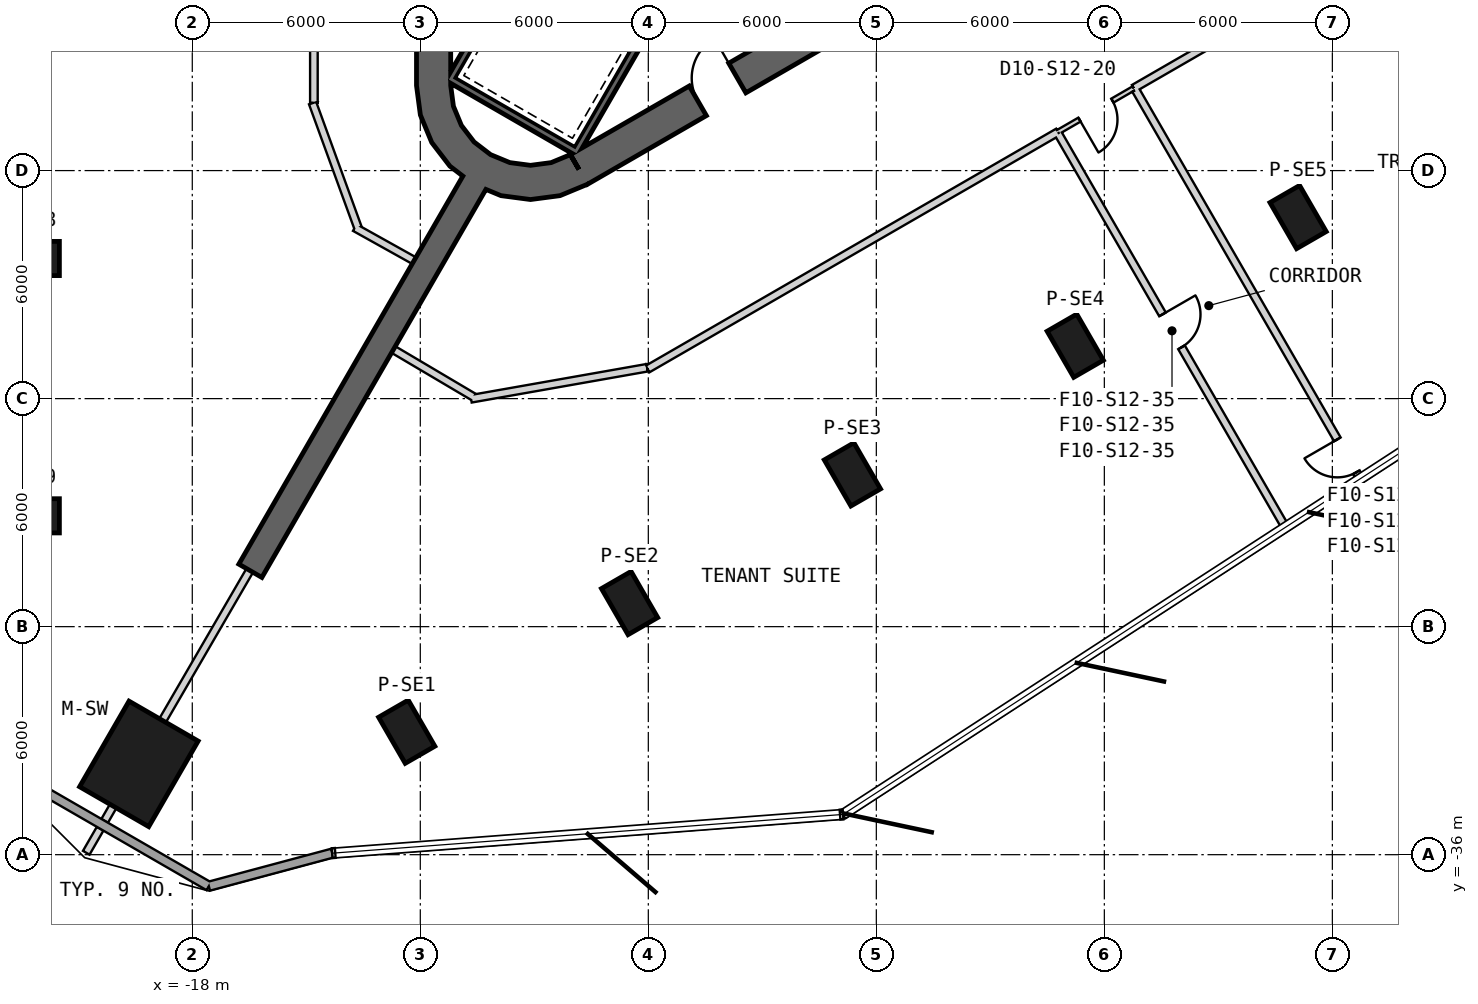
"""IFC4 building model, lengths in metres.
Left out: names, types, materials, properties, quantities, classifications, styles, units other than length and angle.
Written with IfcOpenShell. Run it as: python <this file> out.ifc"""

import sys

from ifc_helpers import new_model, si_unit, direction, frame, frame_2d, origin, origin_2d, place, context, subcontext, project, spatial, polyline, rectangle, outline, extrude, element, fill, save


model = new_model("IFC4")
c1 = context("Model", 3, precision=1e-05, world=origin(), true_north=direction((0.0, 1.0)))
c2 = subcontext(c1, "Body", "Model", "MODEL_VIEW")
j1 = project(units=[si_unit("LENGTHUNIT", "METRE"), si_unit("PLANEANGLEUNIT", "RADIAN")], contexts=[c1])
p1 = place(None, origin())
s1 = spatial("IfcSite", under=j1, at=p1, CompositionType="ELEMENT")
p2 = place(p1, origin())
s2 = spatial("IfcBuilding", under=s1, at=p2, CompositionType="ELEMENT")
p3 = place(p2, frame((0.0, 0.0, 205.2)))
s3 = spatial("IfcBuildingStorey", under=s2, at=p3, CompositionType="ELEMENT", Elevation=205.2)
p4 = place(p3, frame((-19.406, -33.611, 0.0), z_axis=(0.0, 0.0, 1.0), x_axis=(-0.5, -0.866025403784, 0.0)))
e1 = element("IfcColumn", 1, at=p4, inside=s3, PredefinedType="COLUMN", context=c2, shape_type="SweptSolid", body=[
    extrude(rectangle(XDim=2.6, YDim=2.1, at=origin_2d()), origin(), (0.0, 0.0, 1.0), 4.0),
])
for number, where, z_axis, x_axis in (
    (2, (-22.197, -20.313, 0.0), (0.0, 0.0, 1.0), (-1.0, 0.0, 0.0)),
    (3, (-22.197, -27.084, 0.0), (0.0, 0.0, 1.0), (-1.0, 0.0, 0.0)),
    (4, (-12.357, -32.765, 0.0), (0.0, 0.0, 1.0), (0.5, -0.866, 0.0)),
    (5, (-6.493, -29.38, 0.0), (0.0, 0.0, 1.0), (0.5, -0.866, 0.0)),
    (6, (-0.629, -25.994, 0.0), (0.0, 0.0, 1.0), (0.5, -0.866, 0.0)),
    (7, (5.235, -22.609, 0.0), (0.0, 0.0, 1.0), (0.5, -0.866, 0.0)),
    (8, (11.098, -19.223, 0.0), (0.0, 0.0, 1.0), (0.5, -0.866, 0.0)),
):
    element("IfcColumn", number, at=place(p3, frame(where, z_axis=z_axis, x_axis=x_axis)), inside=s3, PredefinedType="COLUMN", context=c2, shape_type="SweptSolid", body=[
        extrude(rectangle(XDim=1.4, YDim=0.9, at=origin_2d()), origin(), (0.0, 0.0, 1.0), 4.0),
    ])
p5 = place(p3, frame((-11.65, 15.762, 0.0), z_axis=(0.0, 0.0, 1.0), x_axis=(0.0, -1.0, 0.0)))
e9 = element("IfcWall", 9, at=p5, inside=s3, PredefinedType="SHEAR", context=c2, shape_type="SweptSolid", body=[
    extrude(rectangle(XDim=31.523, YDim=0.9, at=frame_2d((15.762, 0.0))), origin(), (0.0, 0.0, 1.0), 4.0),
])
p6 = place(p5, frame((7.062, 0.0, 0.0)))
e10 = element("IfcOpeningElement", 10, at=p6, cuts=e9, PredefinedType="OPENING", context=c2, shape_type="SweptSolid", body=[
    extrude(rectangle(XDim=1.2, YDim=2.4, at=frame_2d((0.6, 1.2))), frame((0.0, 0.46, 0.0), z_axis=(0.0, -1.0, 0.0), x_axis=(1.0, 0.0, 0.0)), (0.0, 0.0, 1.0), 0.92),
])
p7 = place(p5, frame((9.762, 0.0, 0.0)))
e11 = element("IfcOpeningElement", 11, at=p7, cuts=e9, PredefinedType="OPENING", context=c2, shape_type="SweptSolid", body=[
    extrude(rectangle(XDim=1.2, YDim=2.4, at=frame_2d((0.6, 1.2))), frame((0.0, 0.46, 0.0), z_axis=(0.0, -1.0, 0.0), x_axis=(1.0, 0.0, 0.0)), (0.0, 0.0, 1.0), 0.92),
])
p8 = place(p5, frame((12.462, 0.0, 0.0)))
e12 = element("IfcOpeningElement", 12, at=p8, cuts=e9, PredefinedType="OPENING", context=c2, shape_type="SweptSolid", body=[
    extrude(rectangle(XDim=1.2, YDim=2.4, at=frame_2d((0.6, 1.2))), frame((0.0, 0.46, 0.0), z_axis=(0.0, -1.0, 0.0), x_axis=(1.0, 0.0, 0.0)), (0.0, 0.0, 1.0), 0.92),
])
p9 = place(p5, frame((15.162, 0.0, 0.0)))
e13 = element("IfcOpeningElement", 13, at=p9, cuts=e9, PredefinedType="OPENING", context=c2, shape_type="SweptSolid", body=[
    extrude(rectangle(XDim=1.2, YDim=2.4, at=frame_2d((0.6, 1.2))), frame((0.0, 0.46, 0.0), z_axis=(0.0, -1.0, 0.0), x_axis=(1.0, 0.0, 0.0)), (0.0, 0.0, 1.0), 0.92),
])
p10 = place(p5, frame((17.862, 0.0, 0.0)))
e14 = element("IfcOpeningElement", 14, at=p10, cuts=e9, PredefinedType="OPENING", context=c2, shape_type="SweptSolid", body=[
    extrude(rectangle(XDim=1.2, YDim=2.4, at=frame_2d((0.6, 1.2))), frame((0.0, 0.46, 0.0), z_axis=(0.0, -1.0, 0.0), x_axis=(1.0, 0.0, 0.0)), (0.0, 0.0, 1.0), 0.92),
])
p11 = place(p5, frame((20.562, 0.0, 0.0)))
e15 = element("IfcOpeningElement", 15, at=p11, cuts=e9, PredefinedType="OPENING", context=c2, shape_type="SweptSolid", body=[
    extrude(rectangle(XDim=1.2, YDim=2.4, at=frame_2d((0.6, 1.2))), frame((0.0, 0.46, 0.0), z_axis=(0.0, -1.0, 0.0), x_axis=(1.0, 0.0, 0.0)), (0.0, 0.0, 1.0), 0.92),
])
p12 = place(p5, frame((23.262, 0.0, 0.0)))
e16 = element("IfcOpeningElement", 16, at=p12, cuts=e9, PredefinedType="OPENING", context=c2, shape_type="SweptSolid", body=[
    extrude(rectangle(XDim=1.2, YDim=2.4, at=frame_2d((0.6, 1.2))), frame((0.0, 0.46, 0.0), z_axis=(0.0, -1.0, 0.0), x_axis=(1.0, 0.0, 0.0)), (0.0, 0.0, 1.0), 0.92),
])
p13 = place(p5, frame((3.612, 0.0, 0.0)))
e17 = element("IfcOpeningElement", 17, at=p13, cuts=e9, PredefinedType="OPENING", context=c2, shape_type="SweptSolid", body=[
    extrude(rectangle(XDim=1.2, YDim=2.4, at=frame_2d((0.6, 1.2))), frame((0.0, 0.46, 0.0), z_axis=(0.0, -1.0, 0.0), x_axis=(1.0, 0.0, 0.0)), (0.0, 0.0, 1.0), 0.92),
])
p14 = place(p5, frame((26.712, 0.0, 0.0)))
e18 = element("IfcOpeningElement", 18, at=p14, cuts=e9, PredefinedType="OPENING", context=c2, shape_type="SweptSolid", body=[
    extrude(rectangle(XDim=1.2, YDim=2.4, at=frame_2d((0.6, 1.2))), frame((0.0, 0.46, 0.0), z_axis=(0.0, -1.0, 0.0), x_axis=(1.0, 0.0, 0.0)), (0.0, 0.0, 1.0), 0.92),
])
p15 = place(p3, frame((-7.825, -17.97, 0.0), z_axis=(0.0, 0.0, 1.0), x_axis=(0.866028369851, 0.499994862586, 0.0)))
e19 = element("IfcWall", 19, at=p15, inside=s3, PredefinedType="SHEAR", context=c2, shape_type="SweptSolid", body=[
    extrude(rectangle(XDim=31.523, YDim=0.9, at=frame_2d((15.762, 0.0))), origin(), (0.0, 0.0, 1.0), 4.0),
])
p16 = place(p15, frame((7.062, 0.0, 0.0)))
e20 = element("IfcOpeningElement", 20, at=p16, cuts=e19, PredefinedType="OPENING", context=c2, shape_type="SweptSolid", body=[
    extrude(rectangle(XDim=1.2, YDim=2.4, at=frame_2d((0.6, 1.2))), frame((0.0, 0.46, 0.0), z_axis=(0.0, -1.0, 0.0), x_axis=(1.0, 0.0, 0.0)), (0.0, 0.0, 1.0), 0.92),
])
p17 = place(p15, frame((9.762, 0.0, 0.0)))
e21 = element("IfcOpeningElement", 21, at=p17, cuts=e19, PredefinedType="OPENING", context=c2, shape_type="SweptSolid", body=[
    extrude(rectangle(XDim=1.2, YDim=2.4, at=frame_2d((0.6, 1.2))), frame((0.0, 0.46, 0.0), z_axis=(0.0, -1.0, 0.0), x_axis=(1.0, 0.0, 0.0)), (0.0, 0.0, 1.0), 0.92),
])
p18 = place(p15, frame((12.462, 0.0, 0.0)))
e22 = element("IfcOpeningElement", 22, at=p18, cuts=e19, PredefinedType="OPENING", context=c2, shape_type="SweptSolid", body=[
    extrude(rectangle(XDim=1.2, YDim=2.4, at=frame_2d((0.6, 1.2))), frame((0.0, 0.46, 0.0), z_axis=(0.0, -1.0, 0.0), x_axis=(1.0, 0.0, 0.0)), (0.0, 0.0, 1.0), 0.92),
])
p19 = place(p15, frame((15.162, 0.0, 0.0)))
e23 = element("IfcOpeningElement", 23, at=p19, cuts=e19, PredefinedType="OPENING", context=c2, shape_type="SweptSolid", body=[
    extrude(rectangle(XDim=1.2, YDim=2.4, at=frame_2d((0.6, 1.2))), frame((0.0, 0.46, 0.0), z_axis=(0.0, -1.0, 0.0), x_axis=(1.0, 0.0, 0.0)), (0.0, 0.0, 1.0), 0.92),
])
p20 = place(p15, frame((17.862, 0.0, 0.0)))
e24 = element("IfcOpeningElement", 24, at=p20, cuts=e19, PredefinedType="OPENING", context=c2, shape_type="SweptSolid", body=[
    extrude(rectangle(XDim=1.2, YDim=2.4, at=frame_2d((0.6, 1.2))), frame((0.0, 0.46, 0.0), z_axis=(0.0, -1.0, 0.0), x_axis=(1.0, 0.0, 0.0)), (0.0, 0.0, 1.0), 0.92),
])
p21 = place(p15, frame((20.562, 0.0, 0.0)))
e25 = element("IfcOpeningElement", 25, at=p21, cuts=e19, PredefinedType="OPENING", context=c2, shape_type="SweptSolid", body=[
    extrude(rectangle(XDim=1.2, YDim=2.4, at=frame_2d((0.6, 1.2))), frame((0.0, 0.46, 0.0), z_axis=(0.0, -1.0, 0.0), x_axis=(1.0, 0.0, 0.0)), (0.0, 0.0, 1.0), 0.92),
])
p22 = place(p15, frame((26.712, 0.0, 0.0)))
e26 = element("IfcOpeningElement", 26, at=p22, cuts=e19, PredefinedType="OPENING", context=c2, shape_type="SweptSolid", body=[
    extrude(rectangle(XDim=1.2, YDim=2.4, at=frame_2d((0.6, 1.2))), frame((0.0, 0.46, 0.0), z_axis=(0.0, -1.0, 0.0), x_axis=(1.0, 0.0, 0.0)), (0.0, 0.0, 1.0), 0.92),
])
p23 = place(p15, frame((3.612, 0.0, 0.0)))
e27 = element("IfcOpeningElement", 27, at=p23, cuts=e19, PredefinedType="OPENING", context=c2, shape_type="SweptSolid", body=[
    extrude(rectangle(XDim=1.2, YDim=2.4, at=frame_2d((0.6, 1.2))), frame((0.0, 0.46, 0.0), z_axis=(0.0, -1.0, 0.0), x_axis=(1.0, 0.0, 0.0)), (0.0, 0.0, 1.0), 0.92),
])
p24 = place(p3, origin())
e28 = element("IfcWall", 28, at=p24, inside=s3, PredefinedType="SHEAR", context=c2, shape_type="SweptSolid", body=[
    extrude(outline(polyline([(-12.1, -15.762), (-11.998, -16.538), (-11.698, -17.262), (-11.221, -17.883), (-10.6, -18.36), (-9.876, -18.659), (-9.1, -18.762), (-8.323, -18.659), (-7.6, -18.36), (-8.05, -17.58), (-8.556, -17.79), (-9.1, -17.862), (-9.644, -17.79), (-10.15, -17.58), (-10.585, -17.247), (-10.919, -16.812), (-11.128, -16.305), (-11.2, -15.762), (-12.1, -15.762)])), origin(), (0.0, 0.0, 1.0), 4.0),
])
p25 = place(p3, frame((-10.575, -18.316, 0.0), z_axis=(0.0, 0.0, 1.0), x_axis=(-0.499999598486, -0.866025635599, 0.0)))
e29 = element("IfcWall", 29, at=p25, inside=s3, PredefinedType="SHEAR", context=c2, shape_type="SweptSolid", body=[
    extrude(rectangle(XDim=11.794, YDim=0.7, at=frame_2d((5.897, 0.0))), origin(), (0.0, 0.0, 1.0), 4.0),
])
p26 = place(p3, frame((-23.114, -33.626, 0.0), z_axis=(0.0, 0.0, 1.0), x_axis=(0.86602381473, -0.500002752313, 0.0)))
e30 = element("IfcWall", 30, at=p26, inside=s3, PredefinedType="SOLIDWALL", context=c2, shape_type="SweptSolid", body=[
    extrude(rectangle(XDim=6.409, YDim=0.24, at=frame_2d((3.204, 0.0))), origin(), (0.0, 0.0, 1.0), 3.7),
])
p27 = place(p3, frame((-17.564, -36.831, 0.0), z_axis=(0.0, 0.0, 1.0), x_axis=(0.965919514081, 0.258842601434, 0.0)))
e31 = element("IfcWall", 31, at=p27, inside=s3, PredefinedType="SOLIDWALL", context=c2, shape_type="SweptSolid", body=[
    extrude(rectangle(XDim=3.361, YDim=0.24, at=frame_2d((1.68, 0.0))), origin(), (0.0, 0.0, 1.0), 3.7),
])
p28 = place(p3, frame((-3.905, -10.563, -0.3), z_axis=(0.0, 0.0, 1.0), x_axis=(-0.500012932018, -0.866017937352, 0.0)))
e32 = element("IfcWall", 32, at=p28, inside=s3, PredefinedType="SHEAR", context=c2, shape_type="SweptSolid", body=[
    extrude(rectangle(XDim=8.1, YDim=0.2, at=frame_2d((4.05, 0.0))), origin(), (0.0, 0.0, 1.0), 4.0),
])
p29 = place(p3, frame((-11.282, -15.541, -0.3), z_axis=(0.0, 0.0, 1.0), x_axis=(0.866000483506, -0.500043160704, 0.0)))
e33 = element("IfcWall", 33, at=p29, inside=s3, PredefinedType="SHEAR", context=c2, shape_type="SweptSolid", body=[
    extrude(rectangle(XDim=3.8, YDim=0.2, at=frame_2d((1.9, 0.0))), origin(), (0.0, 0.0, 1.0), 4.0),
])
p30 = place(p3, frame((-7.196, -8.663, -0.3), z_axis=(0.0, 0.0, 1.0), x_axis=(-0.499997992926, -0.866026562566, 0.0)))
e34 = element("IfcWall", 34, at=p30, inside=s3, PredefinedType="SHEAR", context=c2, shape_type="SweptSolid", body=[
    extrude(rectangle(XDim=7.9, YDim=0.2, at=frame_2d((3.95, 0.0))), origin(), (0.0, 0.0, 1.0), 4.0),
])
p31 = place(p3, frame((-13.722, -19.499, 0.0), z_axis=(0.0, 0.0, 1.0), x_axis=(0.873381780332, -0.487036205824, 0.0)))
e35 = element("IfcWall", 35, at=p31, inside=s3, PredefinedType="PARTITIONING", context=c2, shape_type="SweptSolid", body=[
    extrude(rectangle(XDim=1.785, YDim=0.2, at=frame_2d((0.892, 0.0))), origin(), (0.0, 0.0, 1.0), 3.7),
])
p32 = place(p3, frame((-14.834, -16.223, 0.0), z_axis=(0.0, 0.0, 1.0), x_axis=(0.342017717312, -0.939693503779, 0.0)))
e36 = element("IfcWall", 36, at=p32, inside=s3, PredefinedType="PARTITIONING", context=c2, shape_type="SweptSolid", body=[
    extrude(rectangle(XDim=3.497, YDim=0.2, at=frame_2d((1.749, 0.0))), origin(), (0.0, 0.0, 1.0), 2.78),
])
p33 = place(p3, frame((-14.8, -0.07, 0.0), z_axis=(0.0, 0.0, 1.0), x_axis=(0.0, -1.0, 0.0)))
e37 = element("IfcWall", 37, at=p33, inside=s3, PredefinedType="PARTITIONING", context=c2, shape_type="SweptSolid", body=[
    extrude(rectangle(XDim=16.147, YDim=0.2, at=frame_2d((8.073, 0.0))), origin(), (0.0, 0.0, 1.0), 2.88),
])
p34 = place(p3, frame((6.775, -15.834, 0.0), z_axis=(0.0, 0.0, 1.0), x_axis=(-0.866007057882, -0.500031774688, 0.0)))
e38 = element("IfcWall", 38, at=p34, inside=s3, PredefinedType="PARTITIONING", context=c2, shape_type="SweptSolid", body=[
    extrude(rectangle(XDim=2.3, YDim=0.12, at=frame_2d((1.15, 0.0))), origin(), (0.0, 0.0, 1.0), 3.7),
])
p35 = place(p34, frame((0.65, 0.0, 0.0)))
e39 = element("IfcOpeningElement", 39, at=p35, cuts=e38, PredefinedType="OPENING", context=c2, shape_type="SweptSolid", body=[
    extrude(rectangle(XDim=1.0, YDim=2.1, at=frame_2d((0.5, 1.05))), frame((0.0, 0.07, 0.0), z_axis=(0.0, -1.0, 0.0), x_axis=(1.0, 0.0, 0.0)), (0.0, 0.0, 1.0), 0.14),
])
p36 = place(p3, frame((-6.019, -23.22, 0.0), z_axis=(0.0, 0.0, 1.0), x_axis=(0.866022928472, 0.500004287342, 0.0)))
e40 = element("IfcWall", 40, at=p36, inside=s3, PredefinedType="PARTITIONING", context=c2, shape_type="SweptSolid", body=[
    extrude(rectangle(XDim=12.473, YDim=0.2, at=frame_2d((6.236, 0.0))), origin(), (0.0, 0.0, 1.0), 2.88),
])
p37 = place(p3, frame((6.775, -15.834, 0.0), z_axis=(0.0, 0.0, 1.0), x_axis=(0.86602903513, 0.499993710272, 0.0)))
e41 = element("IfcWall", 41, at=p37, inside=s3, PredefinedType="PARTITIONING", context=c2, shape_type="SweptSolid", body=[
    extrude(rectangle(XDim=12.18, YDim=0.2, at=frame_2d((6.09, 0.0))), origin(), (0.0, 0.0, 1.0), 3.07),
])
p38 = place(p3, frame((-10.665, -24.005, 0.0), z_axis=(0.0, 0.0, 1.0), x_axis=(0.984806532296, 0.173655100553, 0.0)))
e42 = element("IfcWall", 42, at=p38, inside=s3, PredefinedType="PARTITIONING", context=c2, shape_type="SweptSolid", body=[
    extrude(rectangle(XDim=4.706, YDim=0.2, at=frame_2d((2.353, 0.0))), origin(), (0.0, 0.0, 1.0), 2.78),
])
p39 = place(p3, frame((-12.707, -22.709, 0.0), z_axis=(0.0, 0.0, 1.0), x_axis=(0.860754387085, -0.509020515415, 0.0)))
e43 = element("IfcWall", 43, at=p39, inside=s3, PredefinedType="PARTITIONING", context=c2, shape_type="SweptSolid", body=[
    extrude(rectangle(XDim=2.457, YDim=0.2, at=frame_2d((1.229, 0.0))), origin(), (0.0, 0.0, 1.0), 3.7),
])
p40 = place(p3, frame((-20.79, -35.95, 0.0), z_axis=(0.0, 0.0, 1.0), x_axis=(0.499876722092, 0.86609656662, 0.0)))
e44 = element("IfcWall", 44, at=p40, inside=s3, PredefinedType="PARTITIONING", context=c2, shape_type="SweptSolid", body=[
    extrude(rectangle(XDim=0.731, YDim=0.2, at=frame_2d((0.365, 0.0))), origin(), (0.0, 0.0, 1.0), 3.7),
])
p41 = place(p3, frame((-20.305, -35.109, 0.0), z_axis=(0.0, 0.0, 1.0), x_axis=(0.500132045864, 0.865949153646, 0.0)))
e45 = element("IfcWall", 45, at=p41, inside=s3, PredefinedType="PARTITIONING", context=c2, shape_type="SweptSolid", body=[
    extrude(rectangle(XDim=0.447, YDim=0.2, at=frame_2d((0.224, 0.0))), origin(), (0.0, 0.0, 1.0), 3.7),
])
p42 = place(p3, frame((-18.781, -32.47, 0.0), z_axis=(0.0, 0.0, 1.0), x_axis=(0.502274788288, 0.864708064638, 0.0)))
e46 = element("IfcWall", 46, at=p42, inside=s3, PredefinedType="PARTITIONING", context=c2, shape_type="SweptSolid", body=[
    extrude(rectangle(XDim=4.567, YDim=0.2, at=frame_2d((2.284, 0.0))), origin(), (0.0, 0.0, 1.0), 3.27),
])
p43 = place(p3, frame((12.731, -26.111, 0.0), z_axis=(0.0, 0.0, 1.0), x_axis=(-0.499996044039, 0.866027687748, 0.0)))
e47 = element("IfcWall", 47, at=p43, inside=s3, PredefinedType="PARTITIONING", context=c2, shape_type="SweptSolid", body=[
    extrude(rectangle(XDim=11.818, YDim=0.2, at=frame_2d((5.909, 0.0))), origin(), (0.0, 0.0, 1.0), 3.7),
])
p44 = place(p43, frame((0.2, 0.0, 0.0)))
e48 = element("IfcOpeningElement", 48, at=p44, cuts=e47, PredefinedType="OPENING", context=c2, shape_type="SweptSolid", body=[
    extrude(rectangle(XDim=1.0, YDim=2.1, at=frame_2d((0.5, 1.05))), frame((0.0, 0.11, 0.0), z_axis=(0.0, -1.0, 0.0), x_axis=(1.0, 0.0, 0.0)), (0.0, 0.0, 1.0), 0.22),
])
p45 = place(p3, frame((4.795, -17.046, 0.0), z_axis=(0.0, 0.0, 1.0), x_axis=(0.500005050573, -0.866022487815, 0.0)))
e49 = element("IfcWall", 49, at=p45, inside=s3, PredefinedType="PARTITIONING", context=c2, shape_type="SweptSolid", body=[
    extrude(rectangle(XDim=11.94, YDim=0.2, at=frame_2d((5.97, 0.0))), origin(), (0.0, 0.0, 1.0), 3.7),
])
p46 = place(p45, frame((5.47, 0.0, 0.0)))
e50 = element("IfcOpeningElement", 50, at=p46, cuts=e49, PredefinedType="OPENING", context=c2, shape_type="SweptSolid", body=[
    extrude(rectangle(XDim=1.0, YDim=2.1, at=frame_2d((0.5, 1.05))), frame((0.0, 0.11, 0.0), z_axis=(0.0, -1.0, 0.0), x_axis=(1.0, 0.0, 0.0)), (0.0, 0.0, 1.0), 0.22),
])
p47 = place(p35, origin())
e51 = element("IfcDoor", 51, at=p47, inside=s3, OperationType="SINGLE_SWING_RIGHT", PredefinedType="NOTDEFINED", context=c2, shape_type="SweptSolid", body=[
    extrude(rectangle(XDim=1.0, YDim=2.1, at=frame_2d((0.5, 1.05))), frame((0.0, 0.025, 0.0), z_axis=(0.0, -1.0, 0.0), x_axis=(1.0, 0.0, 0.0)), (0.0, 0.0, 1.0), 0.05),
])
fill(e39, e51)
p48 = place(p44, origin())
e52 = element("IfcDoor", 52, at=p48, inside=s3, OperationType="SINGLE_SWING_LEFT", PredefinedType="USERDEFINED", context=c2, shape_type="SweptSolid", body=[
    extrude(rectangle(XDim=1.0, YDim=2.1, at=frame_2d((0.5, 1.05))), frame((0.0, 0.025, 0.0), z_axis=(0.0, -1.0, 0.0), x_axis=(1.0, 0.0, 0.0)), (0.0, 0.0, 1.0), 0.05),
])
fill(e48, e52)
p49 = place(p46, origin())
e53 = element("IfcDoor", 53, at=p49, inside=s3, OperationType="SINGLE_SWING_RIGHT", PredefinedType="USERDEFINED", context=c2, shape_type="SweptSolid", body=[
    extrude(rectangle(XDim=1.0, YDim=2.1, at=frame_2d((0.5, 1.05))), frame((0.0, 0.025, 0.0), z_axis=(0.0, -1.0, 0.0), x_axis=(1.0, 0.0, 0.0)), (0.0, 0.0, 1.0), 0.05),
])
fill(e50, e53)
p50 = place(p23, origin())
e54 = element("IfcDoor", 54, at=p50, inside=s3, OperationType="SINGLE_SWING_LEFT", PredefinedType="USERDEFINED", context=c2, shape_type="SweptSolid", body=[
    extrude(rectangle(XDim=1.2, YDim=2.4, at=frame_2d((0.6, 1.2))), frame((0.0, 0.025, 0.0), z_axis=(0.0, -1.0, 0.0), x_axis=(1.0, 0.0, 0.0)), (0.0, 0.0, 1.0), 0.05),
])
fill(e27, e54)
save(model, sys.argv[1])
